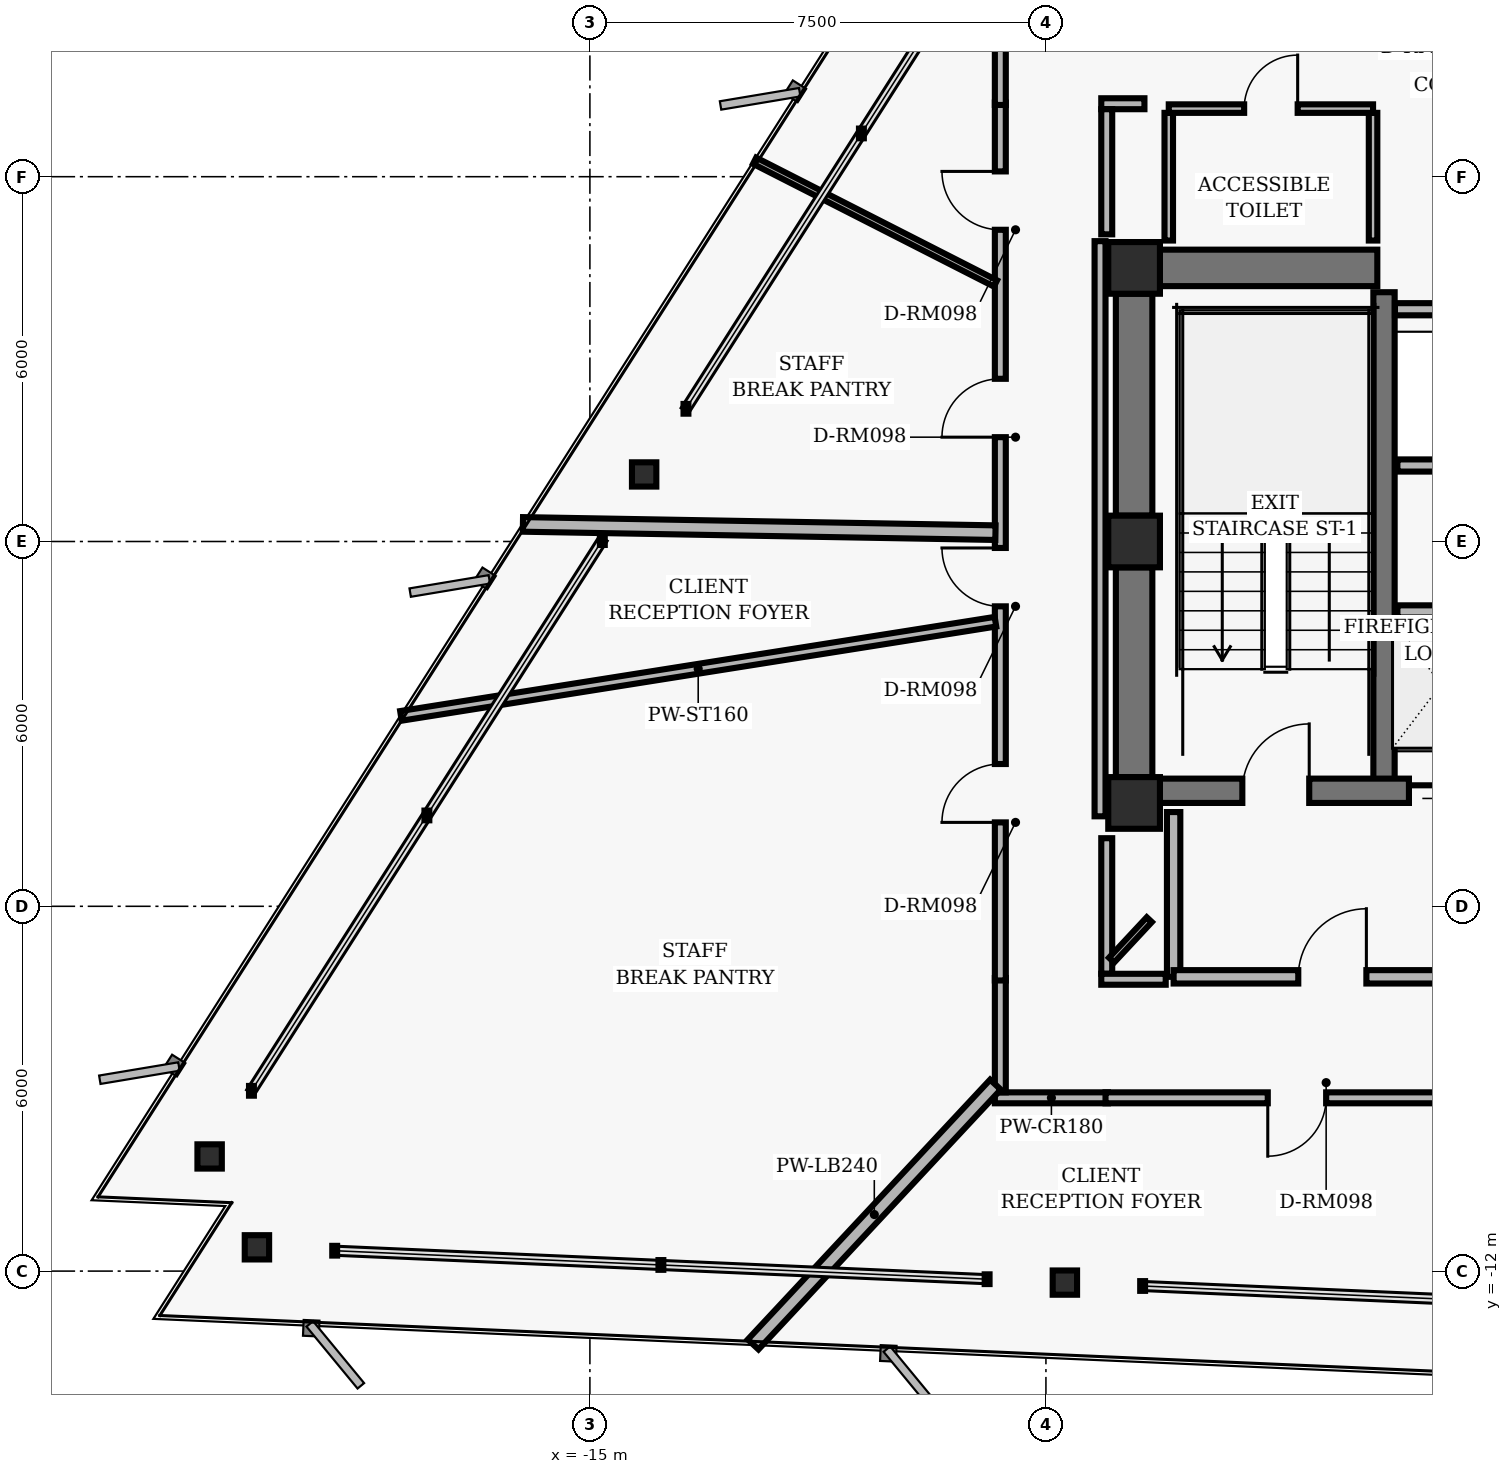
"""IFC4 building model, lengths in metres.
Left out: names, types, materials, properties, quantities, classifications, styles, units other than length and angle.
Written with IfcOpenShell. Run it as: python <this file> out.ifc"""

import sys

from ifc_helpers import new_model, si_unit, direction, frame, frame_2d, origin, origin_2d, place, context, subcontext, project, spatial, rectangle, hollow_rectangle, i_section, extrude, element, fill, save


model = new_model("IFC4")
c1 = context("Model", 3, precision=1e-05, world=origin(), true_north=direction((0.0, 1.0)))
c2 = subcontext(c1, "Body", "Model", "MODEL_VIEW")
j1 = project(units=[si_unit("LENGTHUNIT", "METRE"), si_unit("PLANEANGLEUNIT", "RADIAN")], contexts=[c1])
p1 = place(None, origin())
s1 = spatial("IfcSite", under=j1, at=p1, CompositionType="ELEMENT")
p2 = place(p1, origin())
s2 = spatial("IfcBuilding", under=s1, at=p2, CompositionType="ELEMENT")
p3 = place(p2, frame((0.0, 0.0, 141.12)))
s3 = spatial("IfcBuildingStorey", under=s2, at=p3, CompositionType="ELEMENT", Elevation=141.12)
for number, where, z_axis, x_axis in (
    (1, (-6.05, 4.5, 0.0), (0.0, 0.0, 1.0), (1.0, 0.0, 0.0)),
    (2, (-6.05, 0.0, 0.0), (0.0, 0.0, 1.0), (1.0, 0.0, 0.0)),
    (3, (-6.05, -4.3, 0.0), (0.0, 0.0, 1.0), (1.0, 0.0, 0.0)),
):
    element("IfcColumn", number, at=place(p3, frame(where, z_axis=z_axis, x_axis=x_axis)), inside=s3, PredefinedType="COLUMN", context=c2, shape_type="SweptSolid", body=[
        extrude(hollow_rectangle(XDim=0.85, YDim=0.85, WallThickness=0.055, InnerFilletRadius=0.02, OuterFilletRadius=0.04, at=origin_2d()), origin(), (0.0, 0.0, 1.0), 3.04),
    ])
p4 = place(p3, frame((-6.05, 0.425, 0.0), z_axis=(0.0, 0.0, 1.0), x_axis=(0.0, 1.0, 0.0)))
e4 = element("IfcWall", 4, at=p4, inside=s3, PredefinedType="SHEAR", context=c2, shape_type="SweptSolid", body=[
    extrude(rectangle(XDim=3.65, YDim=0.6, at=frame_2d((1.825, 0.0))), origin(), (0.0, 0.0, 1.0), 2.788),
])
p5 = place(p3, frame((-6.05, -3.875, 0.0), z_axis=(0.0, 0.0, 1.0), x_axis=(0.0, 1.0, 0.0)))
e5 = element("IfcWall", 5, at=p5, inside=s3, PredefinedType="SHEAR", context=c2, shape_type="SweptSolid", body=[
    extrude(rectangle(XDim=3.45, YDim=0.6, at=frame_2d((1.725, 0.0))), origin(), (0.0, 0.0, 1.0), 2.788),
])
p6 = place(p3, frame((-1.94, -4.1, 0.0), z_axis=(0.0, 0.0, 1.0), x_axis=(0.0, 1.0, 0.0)))
e6 = element("IfcWall", 6, at=p6, inside=s3, PredefinedType="SHEAR", context=c2, shape_type="SweptSolid", body=[
    extrude(rectangle(XDim=8.2, YDim=0.35, at=frame_2d((4.1, 0.0))), origin(), (0.0, 0.0, 1.0), 2.788),
])
p7 = place(p3, frame((-5.625, -4.1, 0.0), z_axis=(0.0, 0.0, 1.0), x_axis=(1.0, 0.0, 0.0)))
e7 = element("IfcWall", 7, at=p7, inside=s3, PredefinedType="SHEAR", context=c2, shape_type="SweptSolid", body=[
    extrude(rectangle(XDim=11.25, YDim=0.4, at=frame_2d((5.625, 0.0))), origin(), (0.0, 0.0, 1.0), 2.788),
])
p8 = place(p7, frame((1.355, 0.0, 0.0)))
e8 = element("IfcOpeningElement", 8, at=p8, cuts=e7, PredefinedType="OPENING", context=c2, shape_type="SweptSolid", body=[
    extrude(rectangle(XDim=1.1, YDim=2.04, at=frame_2d((0.55, 1.02))), frame((0.0, 0.21, 0.0), z_axis=(0.0, -1.0, 0.0), x_axis=(1.0, 0.0, 0.0)), (0.0, 0.0, 1.0), 0.42),
])
p9 = place(p7, frame((8.795, 0.0, 0.0)))
e9 = element("IfcOpeningElement", 9, at=p9, cuts=e7, PredefinedType="OPENING", context=c2, shape_type="SweptSolid", body=[
    extrude(rectangle(XDim=1.1, YDim=2.04, at=frame_2d((0.55, 1.02))), frame((0.0, 0.21, 0.0), z_axis=(0.0, -1.0, 0.0), x_axis=(1.0, 0.0, 0.0)), (0.0, 0.0, 1.0), 0.42),
])
p10 = place(p7, frame((4.095, 0.0, 0.0)))
e10 = element("IfcOpeningElement", 10, at=p10, cuts=e7, PredefinedType="OPENING", context=c2, shape_type="SweptSolid", body=[
    extrude(rectangle(XDim=1.06, YDim=2.04, at=frame_2d((0.53, 1.02))), frame((0.0, 0.21, 0.0), z_axis=(0.0, -1.0, 0.0), x_axis=(1.0, 0.0, 0.0)), (0.0, 0.0, 1.0), 0.42),
])
p11 = place(p7, frame((6.095, 0.0, 0.0)))
e11 = element("IfcOpeningElement", 11, at=p11, cuts=e7, PredefinedType="OPENING", context=c2, shape_type="SweptSolid", body=[
    extrude(rectangle(XDim=1.06, YDim=2.04, at=frame_2d((0.53, 1.02))), frame((0.0, 0.21, 0.0), z_axis=(0.0, -1.0, 0.0), x_axis=(1.0, 0.0, 0.0)), (0.0, 0.0, 1.0), 0.42),
])
p12 = place(p3, frame((-5.625, 4.5, 0.0), z_axis=(0.0, 0.0, 1.0), x_axis=(1.0, 0.0, 0.0)))
e12 = element("IfcWall", 12, at=p12, inside=s3, PredefinedType="SHEAR", context=c2, shape_type="SweptSolid", body=[
    extrude(rectangle(XDim=3.575, YDim=0.6, at=frame_2d((1.788, 0.0))), origin(), (0.0, 0.0, 1.0), 2.788),
])
for number, where, z_axis, x_axis in (
    (13, (-14.108, 1.103, 0.0), (0.0, 0.0, 1.0), (1.0, 0.0, 0.0)),
    (14, (-21.254, -10.114, 0.0), (0.0, 0.0, 1.0), (1.0, 0.0, 0.0)),
    (15, (-20.476, -11.609, 0.0), (0.0, 0.0, 1.0), (1.0, 0.0, 0.0)),
    (16, (-7.188, -12.189, 0.0), (0.0, 0.0, 1.0), (1.0, 0.0, 0.0)),
):
    element("IfcColumn", number, at=place(p3, frame(where, z_axis=z_axis, x_axis=x_axis)), inside=s3, PredefinedType="COLUMN", context=c2, shape_type="SweptSolid", body=[
        extrude(i_section(OverallWidth=0.401, OverallDepth=0.399, WebThickness=0.025, FlangeThickness=0.04, FilletRadius=0.018, at=origin_2d()), origin(), (0.0, 0.0, 1.0), 3.04),
    ])
p13 = place(p3, frame((-1.72, -1.15, 0.0), z_axis=(0.0, 0.0, 1.0), x_axis=(1.0, 0.0, 0.0)))
e17 = element("IfcWall", 17, at=p13, inside=s3, PredefinedType="PARTITIONING", context=c2, shape_type="SweptSolid", body=[
    extrude(rectangle(XDim=3.44, YDim=0.2, at=frame_2d((1.72, 0.0))), origin(), (0.0, 0.0, 1.0), 2.763),
])
p14 = place(p3, frame((-5.4, -7.16, 0.0), z_axis=(0.0, 0.0, 1.0), x_axis=(0.0, 1.0, 0.0)))
e18 = element("IfcWall", 18, at=p14, inside=s3, PredefinedType="PARTITIONING", context=c2, shape_type="SweptSolid", body=[
    extrude(rectangle(XDim=2.71, YDim=0.22, at=frame_2d((1.355, 0.0))), origin(), (0.0, 0.0, 1.0), 2.763),
])
p15 = place(p3, frame((-5.4, -7.16, 0.0), z_axis=(0.0, 0.0, 1.0), x_axis=(1.0, 0.0, 0.0)))
e19 = element("IfcWall", 19, at=p15, inside=s3, PredefinedType="PARTITIONING", context=c2, shape_type="SweptSolid", body=[
    extrude(rectangle(XDim=5.4, YDim=0.22, at=frame_2d((2.7, 0.0))), origin(), (0.0, 0.0, 1.0), 2.33),
])
p16 = place(p15, frame((2.05, 0.0, 0.0)))
e20 = element("IfcOpeningElement", 20, at=p16, cuts=e19, PredefinedType="OPENING", context=c2, shape_type="SweptSolid", body=[
    extrude(rectangle(XDim=1.12, YDim=2.02, at=frame_2d((0.56, 1.01))), frame((0.0, 0.12, 0.0), z_axis=(0.0, -1.0, 0.0), x_axis=(1.0, 0.0, 0.0)), (0.0, 0.0, 1.0), 0.24),
])
p17 = place(p3, frame((-1.72, 1.25, 0.0), z_axis=(0.0, 0.0, 1.0), x_axis=(1.0, 0.0, 0.0)))
e21 = element("IfcWall", 21, at=p17, inside=s3, PredefinedType="PARTITIONING", context=c2, shape_type="SweptSolid", body=[
    extrude(rectangle(XDim=3.44, YDim=0.2, at=frame_2d((1.72, 0.0))), origin(), (0.0, 0.0, 1.0), 2.763),
])
p18 = place(p3, frame((-1.76, 3.82, 0.0), z_axis=(0.0, 0.0, 1.0), x_axis=(1.0, 0.0, 0.0)))
e22 = element("IfcWall", 22, at=p18, inside=s3, PredefinedType="PARTITIONING", context=c2, shape_type="SweptSolid", body=[
    extrude(rectangle(XDim=3.52, YDim=0.2, at=frame_2d((1.76, 0.0))), origin(), (0.0, 0.0, 1.0), 2.763),
])
for number, where, z_axis, x_axis in (
    (23, (-5.48, 4.95, 0.0), (0.0, 0.0, 1.0), (0.0, 1.0, 0.0)),
    (24, (-2.12, 4.95, 0.0), (0.0, 0.0, 1.0), (0.0, 1.0, 0.0)),
):
    element("IfcWall", number, at=place(p3, frame(where, z_axis=z_axis, x_axis=x_axis)), inside=s3, PredefinedType="PARTITIONING", context=c2, shape_type="SweptSolid", body=[
        extrude(rectangle(XDim=2.1, YDim=0.14, at=frame_2d((1.05, 0.0))), origin(), (0.0, 0.0, 1.0), 2.763),
    ])
p19 = place(p3, frame((-5.48, 7.12, 0.0), z_axis=(0.0, 0.0, 1.0), x_axis=(1.0, 0.0, 0.0)))
e25 = element("IfcWall", 25, at=p19, inside=s3, PredefinedType="PARTITIONING", context=c2, shape_type="SweptSolid", body=[
    extrude(rectangle(XDim=3.36, YDim=0.14, at=frame_2d((1.68, 0.0))), origin(), (0.0, 0.0, 1.0), 2.33),
])
p20 = place(p19, frame((1.24, 0.0, 0.0)))
e26 = element("IfcOpeningElement", 26, at=p20, cuts=e25, PredefinedType="OPENING", context=c2, shape_type="SweptSolid", body=[
    extrude(rectangle(XDim=0.88, YDim=2.02, at=frame_2d((0.44, 1.01))), frame((0.0, 0.08, 0.0), z_axis=(0.0, -1.0, 0.0), x_axis=(1.0, 0.0, 0.0)), (0.0, 0.0, 1.0), 0.16),
])
p21 = place(p3, frame((-6.48, -9.15, 0.0), z_axis=(0.0, 0.0, 1.0), x_axis=(-1.0, 0.0, 0.0)))
e27 = element("IfcWall", 27, at=p21, inside=s3, PredefinedType="PARTITIONING", context=c2, shape_type="SweptSolid", body=[
    extrude(rectangle(XDim=1.86, YDim=0.18, at=frame_2d((0.93, 0.0))), origin(), (0.0, 0.0, 1.0), 2.33),
])
p22 = place(p3, frame((-8.25, -9.06, 0.0), z_axis=(0.0, 0.0, 1.0), x_axis=(0.0, 1.0, 0.0)))
e28 = element("IfcWall", 28, at=p22, inside=s3, PredefinedType="PARTITIONING", context=c2, shape_type="SweptSolid", body=[
    extrude(rectangle(XDim=1.88, YDim=0.18, at=frame_2d((0.94, 0.0))), origin(), (0.0, 0.0, 1.0), 2.763),
])
p23 = place(p3, frame((-8.25, -7.22, 0.0), z_axis=(0.0, 0.0, 1.0), x_axis=(0.0, 1.0, 0.0)))
e29 = element("IfcWall", 29, at=p23, inside=s3, PredefinedType="PARTITIONING", context=c2, shape_type="SweptSolid", body=[
    extrude(rectangle(XDim=14.44, YDim=0.18, at=frame_2d((7.22, 0.0))), origin(), (0.0, 0.0, 1.0), 2.763),
])
p24 = place(p23, frame((6.154, 0.0, 0.0)))
e30 = element("IfcOpeningElement", 30, at=p24, cuts=e29, PredefinedType="OPENING", context=c2, shape_type="SweptSolid", body=[
    extrude(rectangle(XDim=0.96, YDim=2.02, at=frame_2d((0.48, 1.01))), frame((0.0, 0.1, 0.0), z_axis=(0.0, -1.0, 0.0), x_axis=(1.0, 0.0, 0.0)), (0.0, 0.0, 1.0), 0.2),
])
p25 = place(p23, frame((2.6, 0.0, 0.0)))
e31 = element("IfcOpeningElement", 31, at=p25, cuts=e29, PredefinedType="OPENING", context=c2, shape_type="SweptSolid", body=[
    extrude(rectangle(XDim=0.96, YDim=2.02, at=frame_2d((0.48, 1.01))), frame((0.0, 0.1, 0.0), z_axis=(0.0, -1.0, 0.0), x_axis=(1.0, 0.0, 0.0)), (0.0, 0.0, 1.0), 0.2),
])
p26 = place(p23, frame((12.347, 0.0, 0.0)))
e32 = element("IfcOpeningElement", 32, at=p26, cuts=e29, PredefinedType="OPENING", context=c2, shape_type="SweptSolid", body=[
    extrude(rectangle(XDim=0.96, YDim=2.02, at=frame_2d((0.48, 1.01))), frame((0.0, 0.1, 0.0), z_axis=(0.0, -1.0, 0.0), x_axis=(1.0, 0.0, 0.0)), (0.0, 0.0, 1.0), 0.2),
])
p27 = place(p23, frame((8.936, 0.0, 0.0)))
e33 = element("IfcOpeningElement", 33, at=p27, cuts=e29, PredefinedType="OPENING", context=c2, shape_type="SweptSolid", body=[
    extrude(rectangle(XDim=0.96, YDim=2.02, at=frame_2d((0.48, 1.01))), frame((0.0, 0.1, 0.0), z_axis=(0.0, -1.0, 0.0), x_axis=(1.0, 0.0, 0.0)), (0.0, 0.0, 1.0), 0.2),
])
p28 = place(p3, frame((-8.25, 7.18, 0.0), z_axis=(0.0, 0.0, 1.0), x_axis=(0.0, 1.0, 0.0)))
e34 = element("IfcWall", 34, at=p28, inside=s3, PredefinedType="PARTITIONING", context=c2, shape_type="SweptSolid", body=[
    extrude(rectangle(XDim=1.88, YDim=0.18, at=frame_2d((0.94, 0.0))), origin(), (0.0, 0.0, 1.0), 2.763),
])
p29 = place(p3, frame((10.98, -9.15, 0.0), z_axis=(0.0, 0.0, 1.0), x_axis=(-1.0, 0.0, 0.0)))
e35 = element("IfcWall", 35, at=p29, inside=s3, PredefinedType="PARTITIONING", context=c2, shape_type="SweptSolid", body=[
    extrude(rectangle(XDim=17.5, YDim=0.18, at=frame_2d((8.75, 0.0))), origin(), (0.0, 0.0, 1.0), 2.33),
])
p30 = place(p29, frame((13.872, 0.0, 0.0)))
e36 = element("IfcOpeningElement", 36, at=p30, cuts=e35, PredefinedType="OPENING", context=c2, shape_type="SweptSolid", body=[
    extrude(rectangle(XDim=0.96, YDim=2.02, at=frame_2d((0.48, 1.01))), frame((0.0, 0.1, 0.0), z_axis=(0.0, -1.0, 0.0), x_axis=(1.0, 0.0, 0.0)), (0.0, 0.0, 1.0), 0.2),
])
p31 = place(p29, frame((7.256, 0.0, 0.0)))
e37 = element("IfcOpeningElement", 37, at=p31, cuts=e35, PredefinedType="OPENING", context=c2, shape_type="SweptSolid", body=[
    extrude(rectangle(XDim=0.96, YDim=2.02, at=frame_2d((0.48, 1.01))), frame((0.0, 0.1, 0.0), z_axis=(0.0, -1.0, 0.0), x_axis=(1.0, 0.0, 0.0)), (0.0, 0.0, 1.0), 0.2),
])
p32 = place(p3, frame((-5.88, 7.2, 0.0), z_axis=(0.0, 0.0, 1.0), x_axis=(-1.0, 0.0, 0.0)))
e38 = element("IfcWall", 38, at=p32, inside=s3, PredefinedType="PARTITIONING", context=c2, shape_type="SweptSolid", body=[
    extrude(rectangle(XDim=0.71, YDim=0.18, at=frame_2d((0.355, 0.0))), origin(), (0.0, 0.0, 1.0), 2.33),
])
p33 = place(p3, frame((-6.5, 7.11, 0.0), z_axis=(0.0, 0.0, 1.0), x_axis=(0.0, -1.0, 0.0)))
e39 = element("IfcWall", 39, at=p33, inside=s3, PredefinedType="PARTITIONING", context=c2, shape_type="SweptSolid", body=[
    extrude(rectangle(XDim=2.058, YDim=0.18, at=frame_2d((1.029, 0.0))), origin(), (0.0, 0.0, 1.0), 2.132),
])
p34 = place(p3, frame((-6.61, 4.94, 0.0), z_axis=(0.0, 0.0, 1.0), x_axis=(0.0, -1.0, 0.0)))
e40 = element("IfcWall", 40, at=p34, inside=s3, PredefinedType="PARTITIONING", context=c2, shape_type="SweptSolid", body=[
    extrude(rectangle(XDim=9.46, YDim=0.18, at=frame_2d((4.73, 0.0))), origin(), (0.0, 0.0, 1.0), 2.763),
])
p35 = place(p3, frame((-6.5, -4.88, 0.0), z_axis=(0.0, 0.0, 1.0), x_axis=(0.0, -1.0, 0.0)))
e41 = element("IfcWall", 41, at=p35, inside=s3, PredefinedType="PARTITIONING", context=c2, shape_type="SweptSolid", body=[
    extrude(rectangle(XDim=2.23, YDim=0.18, at=frame_2d((1.115, 0.0))), origin(), (0.0, 0.0, 1.0), 2.132),
])
p36 = place(p3, frame((-6.59, -7.2, 0.0), z_axis=(0.0, 0.0, 1.0), x_axis=(1.0, 0.0, 0.0)))
e42 = element("IfcWall", 42, at=p36, inside=s3, PredefinedType="PARTITIONING", context=c2, shape_type="SweptSolid", body=[
    extrude(rectangle(XDim=1.06, YDim=0.18, at=frame_2d((0.53, 0.0))), origin(), (0.0, 0.0, 1.0), 2.33),
])
p37 = place(p3, frame((-8.33, -1.319, 0.0), z_axis=(0.0, 0.0, 1.0), x_axis=(-0.987688868154, -0.156431134128, 0.0)))
e43 = element("IfcWall", 43, at=p37, inside=s3, PredefinedType="PARTITIONING", context=c2, shape_type="SweptSolid", body=[
    extrude(rectangle(XDim=9.899, YDim=0.16, at=frame_2d((4.95, 0.0))), origin(), (0.0, 0.0, 1.0), 2.763),
])
p38 = place(p3, frame((-5.8, -6.22, 0.0), z_axis=(0.0, 0.0, 1.0), x_axis=(-0.681964083565, -0.731385663469, 0.0)))
e44 = element("IfcWall", 44, at=p38, inside=s3, PredefinedType="MOVABLE", context=c2, shape_type="SweptSolid", body=[
    extrude(rectangle(XDim=0.909, YDim=0.115, at=frame_2d((0.455, 0.0))), origin(), (0.0, 0.0, 1.0), 2.763),
])
p39 = place(p3, frame((-8.33, -8.933, 0.0), z_axis=(0.0, 0.0, 1.0), x_axis=(-0.682004079658, -0.731348367968, 0.0)))
e45 = element("IfcWall", 45, at=p39, inside=s3, PredefinedType="PARTITIONING", context=c2, shape_type="SweptSolid", body=[
    extrude(rectangle(XDim=5.843, YDim=0.24, at=frame_2d((2.922, 0.0))), origin(), (0.0, 0.0, 1.0), 2.763),
])
p40 = place(p3, frame((-8.33, 4.244, 0.0), z_axis=(0.0, 0.0, 1.0), x_axis=(-0.890996324909, 0.454010516397, 0.0)))
e46 = element("IfcWall", 46, at=p40, inside=s3, PredefinedType="MOVABLE", context=c2, shape_type="SweptSolid", body=[
    extrude(rectangle(XDim=4.446, YDim=0.115, at=frame_2d((2.223, 0.0))), origin(), (0.0, 0.0, 1.0), 2.763),
])
p41 = place(p3, frame((-8.33, 0.146, 0.0), z_axis=(0.0, 0.0, 1.0), x_axis=(-0.999848040059, 0.017432635783, 0.0)))
e47 = element("IfcWall", 47, at=p41, inside=s3, PredefinedType="PARTITIONING", context=c2, shape_type="SweptSolid", body=[
    extrude(rectangle(XDim=7.773, YDim=0.24, at=frame_2d((3.886, 0.0))), origin(), (0.0, 0.0, 1.0), 2.132),
])
p42 = place(p8, origin())
e48 = element("IfcDoor", 48, at=p42, inside=s3, OperationType="SINGLE_SWING_RIGHT", PredefinedType="DOOR", context=c2, shape_type="SweptSolid", body=[
    extrude(rectangle(XDim=1.1, YDim=2.04, at=frame_2d((0.55, 1.02))), frame((0.0, 0.025, 0.0), z_axis=(0.0, -1.0, 0.0), x_axis=(1.0, 0.0, 0.0)), (0.0, 0.0, 1.0), 0.05),
])
fill(e8, e48)
p43 = place(p10, origin())
e49 = element("IfcDoor", 49, at=p43, inside=s3, OperationType="SLIDING_TO_LEFT", PredefinedType="DOOR", context=c2, shape_type="SweptSolid", body=[
    extrude(rectangle(XDim=1.06, YDim=2.04, at=frame_2d((0.53, 1.02))), frame((0.0, 0.025, 0.0), z_axis=(0.0, -1.0, 0.0), x_axis=(1.0, 0.0, 0.0)), (0.0, 0.0, 1.0), 0.05),
])
fill(e10, e49)
p44 = place(p16, origin())
e50 = element("IfcDoor", 50, at=p44, inside=s3, OperationType="SINGLE_SWING_RIGHT", PredefinedType="DOOR", context=c2, shape_type="SweptSolid", body=[
    extrude(rectangle(XDim=1.12, YDim=2.02, at=frame_2d((0.56, 1.01))), frame((0.0, 0.025, 0.0), z_axis=(0.0, -1.0, 0.0), x_axis=(1.0, 0.0, 0.0)), (0.0, 0.0, 1.0), 0.05),
])
fill(e20, e50)
p45 = place(p20, origin())
e51 = element("IfcDoor", 51, at=p45, inside=s3, OperationType="SINGLE_SWING_RIGHT", PredefinedType="DOOR", context=c2, shape_type="SweptSolid", body=[
    extrude(rectangle(XDim=0.88, YDim=2.02, at=frame_2d((0.44, 1.01))), frame((0.0, 0.025, 0.0), z_axis=(0.0, -1.0, 0.0), x_axis=(1.0, 0.0, 0.0)), (0.0, 0.0, 1.0), 0.05),
])
fill(e26, e51)
p46 = place(p24, origin())
e52 = element("IfcDoor", 52, at=p46, inside=s3, OperationType="SINGLE_SWING_RIGHT", PredefinedType="DOOR", context=c2, shape_type="SweptSolid", body=[
    extrude(rectangle(XDim=0.96, YDim=2.02, at=frame_2d((0.48, 1.01))), frame((0.0, 0.025, 0.0), z_axis=(0.0, -1.0, 0.0), x_axis=(1.0, 0.0, 0.0)), (0.0, 0.0, 1.0), 0.05),
])
fill(e30, e52)
p47 = place(p25, origin())
e53 = element("IfcDoor", 53, at=p47, inside=s3, OperationType="SINGLE_SWING_LEFT", PredefinedType="DOOR", context=c2, shape_type="SweptSolid", body=[
    extrude(rectangle(XDim=0.96, YDim=2.02, at=frame_2d((0.48, 1.01))), frame((0.0, 0.025, 0.0), z_axis=(0.0, -1.0, 0.0), x_axis=(1.0, 0.0, 0.0)), (0.0, 0.0, 1.0), 0.05),
])
fill(e31, e53)
p48 = place(p30, origin())
e54 = element("IfcDoor", 54, at=p48, inside=s3, OperationType="SINGLE_SWING_RIGHT", PredefinedType="DOOR", context=c2, shape_type="SweptSolid", body=[
    extrude(rectangle(XDim=0.96, YDim=2.02, at=frame_2d((0.48, 1.01))), frame((0.0, 0.025, 0.0), z_axis=(0.0, -1.0, 0.0), x_axis=(1.0, 0.0, 0.0)), (0.0, 0.0, 1.0), 0.05),
])
fill(e36, e54)
p49 = place(p26, origin())
e55 = element("IfcDoor", 55, at=p49, inside=s3, OperationType="SINGLE_SWING_RIGHT", PredefinedType="DOOR", context=c2, shape_type="SweptSolid", body=[
    extrude(rectangle(XDim=0.96, YDim=2.02, at=frame_2d((0.48, 1.01))), frame((0.0, 0.025, 0.0), z_axis=(0.0, -1.0, 0.0), x_axis=(1.0, 0.0, 0.0)), (0.0, 0.0, 1.0), 0.05),
])
fill(e32, e55)
p50 = place(p27, origin())
e56 = element("IfcDoor", 56, at=p50, inside=s3, OperationType="SINGLE_SWING_LEFT", PredefinedType="DOOR", context=c2, shape_type="SweptSolid", body=[
    extrude(rectangle(XDim=0.96, YDim=2.02, at=frame_2d((0.48, 1.01))), frame((0.0, 0.025, 0.0), z_axis=(0.0, -1.0, 0.0), x_axis=(1.0, 0.0, 0.0)), (0.0, 0.0, 1.0), 0.05),
])
fill(e33, e56)
save(model, sys.argv[1])
